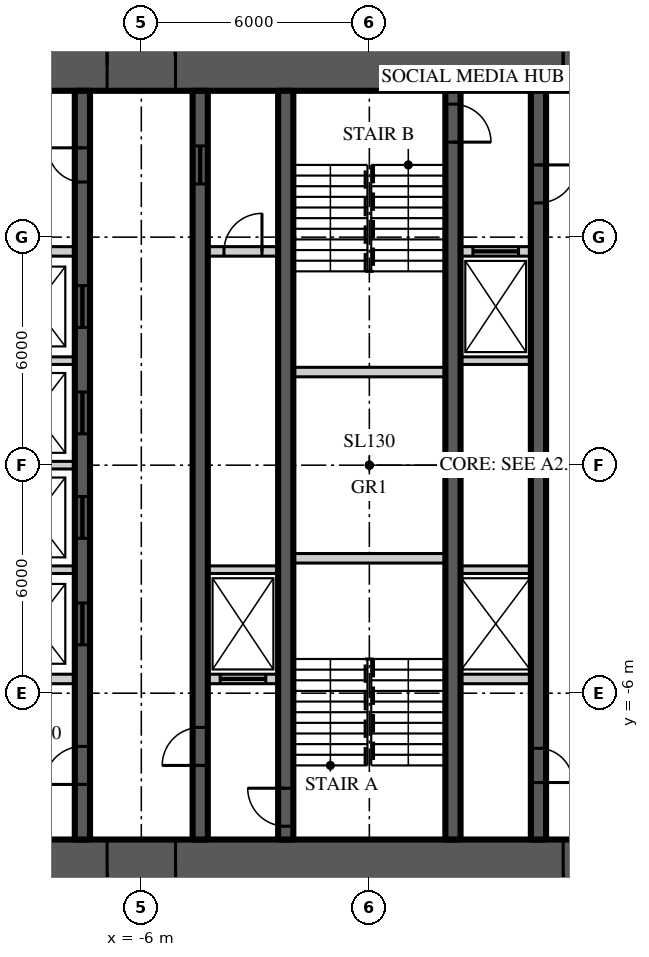
"""IFC4 building model, lengths in metres.
Left out: names, types, materials, properties, quantities, classifications, styles, units other than length and angle.
Written with IfcOpenShell. Run it as: python <this file> out.ifc"""

import sys

from ifc_helpers import new_model, si_unit, direction, frame, frame_2d, origin, place, context, subcontext, project, spatial, rectangle, extrude, element, fill, save


model = new_model("IFC4")
c1 = context("Model", 3, precision=1e-05, world=origin(), true_north=direction((0.0, 1.0)))
c2 = subcontext(c1, "Body", "Model", "MODEL_VIEW")
j1 = project(units=[si_unit("LENGTHUNIT", "METRE"), si_unit("PLANEANGLEUNIT", "RADIAN")], contexts=[c1])
p1 = place(None, origin())
s1 = spatial("IfcSite", under=j1, at=p1, CompositionType="ELEMENT")
p2 = place(p1, origin())
s2 = spatial("IfcBuilding", under=s1, at=p2, CompositionType="ELEMENT")
p3 = place(p2, frame((0.0, 0.0, 70.8)))
s3 = spatial("IfcBuildingStorey", under=s2, at=p3, CompositionType="ELEMENT", Elevation=70.8)
p4 = place(p3, frame((-11.15, 10.5, 0.0), z_axis=(0.0, 0.0, 1.0), x_axis=(1.0, 0.0, 0.0)))
e1 = element("IfcWall", 1, at=p4, inside=s3, PredefinedType="SHEAR", context=c2, shape_type="SweptSolid", body=[
    extrude(rectangle(XDim=22.3, YDim=1.3, at=frame_2d((11.15, 0.0))), origin(), (0.0, 0.0, 1.0), 3.9),
])
p5 = place(p4, frame((4.25, 0.0, 0.0)))
e2 = element("IfcOpeningElement", 2, at=p5, cuts=e1, PredefinedType="OPENING", context=c2, shape_type="SweptSolid", body=[
    extrude(rectangle(XDim=1.8, YDim=2.2, at=frame_2d((0.9, 1.1))), frame((0.0, 0.66, 0.0), z_axis=(0.0, -1.0, 0.0), x_axis=(1.0, 0.0, 0.0)), (0.0, 0.0, 1.0), 1.32),
])
p6 = place(p4, frame((16.25, 0.0, 0.0)))
e3 = element("IfcOpeningElement", 3, at=p6, cuts=e1, PredefinedType="OPENING", context=c2, shape_type="SweptSolid", body=[
    extrude(rectangle(XDim=1.8, YDim=2.2, at=frame_2d((0.9, 1.1))), frame((0.0, 0.66, 0.0), z_axis=(0.0, -1.0, 0.0), x_axis=(1.0, 0.0, 0.0)), (0.0, 0.0, 1.0), 1.32),
])
p7 = place(p3, frame((11.15, -10.5, 0.0), z_axis=(0.0, 0.0, 1.0), x_axis=(-1.0, 0.0, 0.0)))
e4 = element("IfcWall", 4, at=p7, inside=s3, PredefinedType="SHEAR", context=c2, shape_type="SweptSolid", body=[
    extrude(rectangle(XDim=22.3, YDim=1.3, at=frame_2d((11.15, 0.0))), origin(), (0.0, 0.0, 1.0), 3.9),
])
p8 = place(p7, frame((16.25, 0.0, 0.0)))
e5 = element("IfcOpeningElement", 5, at=p8, cuts=e4, PredefinedType="OPENING", context=c2, shape_type="SweptSolid", body=[
    extrude(rectangle(XDim=1.8, YDim=2.2, at=frame_2d((0.9, 1.1))), frame((0.0, 0.66, 0.0), z_axis=(0.0, -1.0, 0.0), x_axis=(1.0, 0.0, 0.0)), (0.0, 0.0, 1.0), 1.32),
])
p9 = place(p7, frame((4.25, 0.0, 0.0)))
e6 = element("IfcOpeningElement", 6, at=p9, cuts=e4, PredefinedType="OPENING", context=c2, shape_type="SweptSolid", body=[
    extrude(rectangle(XDim=1.8, YDim=2.2, at=frame_2d((0.9, 1.1))), frame((0.0, 0.66, 0.0), z_axis=(0.0, -1.0, 0.0), x_axis=(1.0, 0.0, 0.0)), (0.0, 0.0, 1.0), 1.32),
])
p10 = place(p3, frame((-7.55, -9.85, 0.0), z_axis=(0.0, 0.0, 1.0), x_axis=(0.0, 1.0, 0.0)))
e7 = element("IfcWall", 7, at=p10, inside=s3, PredefinedType="SHEAR", context=c2, shape_type="SweptSolid", body=[
    extrude(rectangle(XDim=19.7, YDim=0.4, at=frame_2d((9.85, 0.0))), origin(), (0.0, 0.0, 1.0), 3.9),
])
p11 = place(p10, frame((1.45, 0.0, 0.0)))
e8 = element("IfcOpeningElement", 8, at=p11, cuts=e7, PredefinedType="OPENING", context=c2, shape_type="SweptSolid", body=[
    extrude(rectangle(XDim=1.0, YDim=2.2, at=frame_2d((0.5, 1.1))), frame((0.0, 0.21, 0.0), z_axis=(0.0, -1.0, 0.0), x_axis=(1.0, 0.0, 0.0)), (0.0, 0.0, 1.0), 0.42),
])
p12 = place(p10, frame((17.3, 0.0, 0.0)))
e9 = element("IfcOpeningElement", 9, at=p12, cuts=e7, PredefinedType="OPENING", context=c2, shape_type="SweptSolid", body=[
    extrude(rectangle(XDim=0.9, YDim=2.1, at=frame_2d((0.45, 1.05))), frame((0.0, 0.21, 0.0), z_axis=(0.0, -1.0, 0.0), x_axis=(1.0, 0.0, 0.0)), (0.0, 0.0, 1.0), 0.42),
])
p13 = place(p10, frame((5.125, 0.0, 0.0)))
e10 = element("IfcOpeningElement", 10, at=p13, cuts=e7, PredefinedType="OPENING", context=c2, shape_type="SweptSolid", body=[
    extrude(rectangle(XDim=1.1, YDim=2.2, at=frame_2d((0.55, 1.1))), frame((0.0, 0.21, 0.0), z_axis=(0.0, -1.0, 0.0), x_axis=(1.0, 0.0, 0.0)), (0.0, 0.0, 1.0), 0.42),
])
p14 = place(p10, frame((7.925, 0.0, 0.0)))
e11 = element("IfcOpeningElement", 11, at=p14, cuts=e7, PredefinedType="OPENING", context=c2, shape_type="SweptSolid", body=[
    extrude(rectangle(XDim=1.1, YDim=2.2, at=frame_2d((0.55, 1.1))), frame((0.0, 0.21, 0.0), z_axis=(0.0, -1.0, 0.0), x_axis=(1.0, 0.0, 0.0)), (0.0, 0.0, 1.0), 0.42),
])
p15 = place(p10, frame((10.675, 0.0, 0.0)))
e12 = element("IfcOpeningElement", 12, at=p15, cuts=e7, PredefinedType="OPENING", context=c2, shape_type="SweptSolid", body=[
    extrude(rectangle(XDim=1.1, YDim=2.2, at=frame_2d((0.55, 1.1))), frame((0.0, 0.21, 0.0), z_axis=(0.0, -1.0, 0.0), x_axis=(1.0, 0.0, 0.0)), (0.0, 0.0, 1.0), 0.42),
])
p16 = place(p10, frame((13.475, 0.0, 0.0)))
e13 = element("IfcOpeningElement", 13, at=p16, cuts=e7, PredefinedType="OPENING", context=c2, shape_type="SweptSolid", body=[
    extrude(rectangle(XDim=1.1, YDim=2.2, at=frame_2d((0.55, 1.1))), frame((0.0, 0.21, 0.0), z_axis=(0.0, -1.0, 0.0), x_axis=(1.0, 0.0, 0.0)), (0.0, 0.0, 1.0), 0.42),
])
p17 = place(p3, frame((-4.45, -9.85, 0.0), z_axis=(0.0, 0.0, 1.0), x_axis=(0.0, 1.0, 0.0)))
e14 = element("IfcWall", 14, at=p17, inside=s3, PredefinedType="SHEAR", context=c2, shape_type="SweptSolid", body=[
    extrude(rectangle(XDim=19.7, YDim=0.4, at=frame_2d((9.85, 0.0))), origin(), (0.0, 0.0, 1.0), 3.9),
])
p18 = place(p17, frame((1.95, 0.0, 0.0)))
e15 = element("IfcOpeningElement", 15, at=p18, cuts=e14, PredefinedType="OPENING", context=c2, shape_type="SweptSolid", body=[
    extrude(rectangle(XDim=1.0, YDim=2.2, at=frame_2d((0.5, 1.1))), frame((0.0, 0.21, 0.0), z_axis=(0.0, -1.0, 0.0), x_axis=(1.0, 0.0, 0.0)), (0.0, 0.0, 1.0), 0.42),
])
p19 = place(p17, frame((17.25, 0.0, 0.0)))
e16 = element("IfcOpeningElement", 16, at=p19, cuts=e14, PredefinedType="OPENING", context=c2, shape_type="SweptSolid", body=[
    extrude(rectangle(XDim=1.0, YDim=2.1, at=frame_2d((0.5, 1.05))), frame((0.0, 0.21, 0.0), z_axis=(0.0, -1.0, 0.0), x_axis=(1.0, 0.0, 0.0)), (0.0, 0.0, 1.0), 0.42),
])
p20 = place(p3, frame((4.45, 9.85, 0.0), z_axis=(0.0, 0.0, 1.0), x_axis=(0.0, -1.0, 0.0)))
e17 = element("IfcWall", 17, at=p20, inside=s3, PredefinedType="SHEAR", context=c2, shape_type="SweptSolid", body=[
    extrude(rectangle(XDim=19.7, YDim=0.4, at=frame_2d((9.85, 0.0))), origin(), (0.0, 0.0, 1.0), 3.9),
])
p21 = place(p20, frame((1.95, 0.0, 0.0)))
e18 = element("IfcOpeningElement", 18, at=p21, cuts=e17, PredefinedType="OPENING", context=c2, shape_type="SweptSolid", body=[
    extrude(rectangle(XDim=1.0, YDim=2.2, at=frame_2d((0.5, 1.1))), frame((0.0, 0.21, 0.0), z_axis=(0.0, -1.0, 0.0), x_axis=(1.0, 0.0, 0.0)), (0.0, 0.0, 1.0), 0.42),
])
p22 = place(p20, frame((17.3, 0.0, 0.0)))
e19 = element("IfcOpeningElement", 19, at=p22, cuts=e17, PredefinedType="OPENING", context=c2, shape_type="SweptSolid", body=[
    extrude(rectangle(XDim=0.9, YDim=2.1, at=frame_2d((0.45, 1.05))), frame((0.0, 0.21, 0.0), z_axis=(0.0, -1.0, 0.0), x_axis=(1.0, 0.0, 0.0)), (0.0, 0.0, 1.0), 0.42),
])
p23 = place(p3, frame((-2.2, -9.85, 0.0), z_axis=(0.0, 0.0, 1.0), x_axis=(0.0, 1.0, 0.0)))
e20 = element("IfcWall", 20, at=p23, inside=s3, PredefinedType="SHEAR", context=c2, shape_type="SweptSolid", body=[
    extrude(rectangle(XDim=19.7, YDim=0.4, at=frame_2d((9.85, 0.0))), origin(), (0.0, 0.0, 1.0), 3.9),
])
p24 = place(p23, frame((0.35, 0.0, 0.0)))
e21 = element("IfcOpeningElement", 21, at=p24, cuts=e20, PredefinedType="OPENING", context=c2, shape_type="SweptSolid", body=[
    extrude(rectangle(XDim=1.0, YDim=2.2, at=frame_2d((0.5, 1.1))), frame((0.0, 0.21, 0.0), z_axis=(0.0, -1.0, 0.0), x_axis=(1.0, 0.0, 0.0)), (0.0, 0.0, 1.0), 0.42),
])
p25 = place(p3, frame((2.2, 9.85, 0.0), z_axis=(0.0, 0.0, 1.0), x_axis=(0.0, -1.0, 0.0)))
e22 = element("IfcWall", 22, at=p25, inside=s3, PredefinedType="SHEAR", context=c2, shape_type="SweptSolid", body=[
    extrude(rectangle(XDim=19.7, YDim=0.4, at=frame_2d((9.85, 0.0))), origin(), (0.0, 0.0, 1.0), 3.9),
])
p26 = place(p25, frame((0.35, 0.0, 0.0)))
e23 = element("IfcOpeningElement", 23, at=p26, cuts=e22, PredefinedType="OPENING", context=c2, shape_type="SweptSolid", body=[
    extrude(rectangle(XDim=1.0, YDim=2.2, at=frame_2d((0.5, 1.1))), frame((0.0, 0.21, 0.0), z_axis=(0.0, -1.0, 0.0), x_axis=(1.0, 0.0, 0.0)), (0.0, 0.0, 1.0), 0.42),
])
p27 = place(p3, frame((-9.85, 5.625, 0.0), z_axis=(0.0, 0.0, 1.0), x_axis=(1.0, 0.0, 0.0)))
e24 = element("IfcWall", 24, at=p27, inside=s3, PredefinedType="SOLIDWALL", context=c2, shape_type="SweptSolid", body=[
    extrude(rectangle(XDim=2.1, YDim=0.25, at=frame_2d((1.05, 0.0))), origin(), (0.0, 0.0, 1.0), 3.7),
])
p28 = place(p3, frame((-4.25, 5.625, 0.0), z_axis=(0.0, 0.0, 1.0), x_axis=(1.0, 0.0, 0.0)))
e25 = element("IfcWall", 25, at=p28, inside=s3, PredefinedType="SOLIDWALL", context=c2, shape_type="SweptSolid", body=[
    extrude(rectangle(XDim=1.85, YDim=0.25, at=frame_2d((0.925, 0.0))), origin(), (0.0, 0.0, 1.0), 3.7),
])
p29 = place(p28, frame((0.425, 0.0, 0.0)))
e26 = element("IfcOpeningElement", 26, at=p29, cuts=e25, PredefinedType="OPENING", context=c2, shape_type="SweptSolid", body=[
    extrude(rectangle(XDim=1.0, YDim=2.2, at=frame_2d((0.5, 1.1))), frame((0.0, 0.135, 0.0), z_axis=(0.0, -1.0, 0.0), x_axis=(1.0, 0.0, 0.0)), (0.0, 0.0, 1.0), 0.27),
])
p30 = place(p3, frame((2.4, 5.625, 0.0), z_axis=(0.0, 0.0, 1.0), x_axis=(1.0, 0.0, 0.0)))
e27 = element("IfcWall", 27, at=p30, inside=s3, PredefinedType="SOLIDWALL", context=c2, shape_type="SweptSolid", body=[
    extrude(rectangle(XDim=1.85, YDim=0.25, at=frame_2d((0.925, 0.0))), origin(), (0.0, 0.0, 1.0), 3.7),
])
p31 = place(p30, frame((0.325, 0.0, 0.0)))
e28 = element("IfcOpeningElement", 28, at=p31, cuts=e27, PredefinedType="OPENING", context=c2, shape_type="SweptSolid", body=[
    extrude(rectangle(XDim=1.2, YDim=2.2, at=frame_2d((0.6, 1.1))), frame((0.0, 0.135, 0.0), z_axis=(0.0, -1.0, 0.0), x_axis=(1.0, 0.0, 0.0)), (0.0, 0.0, 1.0), 0.27),
])
p32 = place(p3, frame((-9.85, -5.625, 0.0), z_axis=(0.0, 0.0, 1.0), x_axis=(1.0, 0.0, 0.0)))
e29 = element("IfcWall", 29, at=p32, inside=s3, PredefinedType="SOLIDWALL", context=c2, shape_type="SweptSolid", body=[
    extrude(rectangle(XDim=2.1, YDim=0.25, at=frame_2d((1.05, 0.0))), origin(), (0.0, 0.0, 1.0), 3.7),
])
p33 = place(p3, frame((-4.25, -5.625, 0.0), z_axis=(0.0, 0.0, 1.0), x_axis=(1.0, 0.0, 0.0)))
e30 = element("IfcWall", 30, at=p33, inside=s3, PredefinedType="SOLIDWALL", context=c2, shape_type="SweptSolid", body=[
    extrude(rectangle(XDim=1.85, YDim=0.25, at=frame_2d((0.925, 0.0))), origin(), (0.0, 0.0, 1.0), 3.7),
])
p34 = place(p33, frame((0.325, 0.0, 0.0)))
e31 = element("IfcOpeningElement", 31, at=p34, cuts=e30, PredefinedType="OPENING", context=c2, shape_type="SweptSolid", body=[
    extrude(rectangle(XDim=1.2, YDim=2.2, at=frame_2d((0.6, 1.1))), frame((0.0, 0.135, 0.0), z_axis=(0.0, -1.0, 0.0), x_axis=(1.0, 0.0, 0.0)), (0.0, 0.0, 1.0), 0.27),
])
p35 = place(p3, frame((2.4, -5.625, 0.0), z_axis=(0.0, 0.0, 1.0), x_axis=(1.0, 0.0, 0.0)))
e32 = element("IfcWall", 32, at=p35, inside=s3, PredefinedType="SOLIDWALL", context=c2, shape_type="SweptSolid", body=[
    extrude(rectangle(XDim=1.85, YDim=0.25, at=frame_2d((0.925, 0.0))), origin(), (0.0, 0.0, 1.0), 3.7),
])
for number, where, z_axis, x_axis in (
    (33, (-2.0, -2.45, 0.0), (0.0, 0.0, 1.0), (1.0, 0.0, 0.0)),
    (34, (-2.0, 2.45, 0.0), (0.0, 0.0, 1.0), (1.0, 0.0, 0.0)),
):
    element("IfcWall", number, at=place(p3, frame(where, z_axis=z_axis, x_axis=x_axis)), inside=s3, PredefinedType="SOLIDWALL", context=c2, shape_type="SweptSolid", body=[
        extrude(rectangle(XDim=4.0, YDim=0.25, at=frame_2d((2.0, 0.0))), origin(), (0.0, 0.0, 1.0), 3.7),
    ])
p36 = place(p3, frame((-9.85, -2.75, 0.0), z_axis=(0.0, 0.0, 1.0), x_axis=(1.0, 0.0, 0.0)))
e35 = element("IfcWall", 35, at=p36, inside=s3, PredefinedType="SOLIDWALL", context=c2, shape_type="SweptSolid", body=[
    extrude(rectangle(XDim=2.1, YDim=0.2, at=frame_2d((1.05, 0.0))), origin(), (0.0, 0.0, 1.0), 3.7),
])
for number, where, z_axis, x_axis in (
    (36, (-4.25, -2.75, 0.0), (0.0, 0.0, 1.0), (1.0, 0.0, 0.0)),
    (37, (2.4, -2.75, 0.0), (0.0, 0.0, 1.0), (1.0, 0.0, 0.0)),
):
    element("IfcWall", number, at=place(p3, frame(where, z_axis=z_axis, x_axis=x_axis)), inside=s3, PredefinedType="SOLIDWALL", context=c2, shape_type="SweptSolid", body=[
        extrude(rectangle(XDim=1.85, YDim=0.2, at=frame_2d((0.925, 0.0))), origin(), (0.0, 0.0, 1.0), 3.7),
    ])
for number, where, z_axis, x_axis in (
    (38, (-9.85, 0.0, 0.0), (0.0, 0.0, 1.0), (1.0, 0.0, 0.0)),
    (39, (-9.85, 2.75, 0.0), (0.0, 0.0, 1.0), (1.0, 0.0, 0.0)),
):
    element("IfcWall", number, at=place(p3, frame(where, z_axis=z_axis, x_axis=x_axis)), inside=s3, PredefinedType="SOLIDWALL", context=c2, shape_type="SweptSolid", body=[
        extrude(rectangle(XDim=2.1, YDim=0.2, at=frame_2d((1.05, 0.0))), origin(), (0.0, 0.0, 1.0), 3.7),
    ])
p37 = place(p3, frame((2.4, 2.75, 0.0), z_axis=(0.0, 0.0, 1.0), x_axis=(1.0, 0.0, 0.0)))
e40 = element("IfcWall", 40, at=p37, inside=s3, PredefinedType="SOLIDWALL", context=c2, shape_type="SweptSolid", body=[
    extrude(rectangle(XDim=1.85, YDim=0.2, at=frame_2d((0.925, 0.0))), origin(), (0.0, 0.0, 1.0), 3.7),
])
p38 = place(p5, origin())
e41 = element("IfcDoor", 41, at=p38, inside=s3, OperationType="DOUBLE_DOOR_DOUBLE_SWING", PredefinedType="DOOR", context=c2, shape_type="SweptSolid", body=[
    extrude(rectangle(XDim=1.8, YDim=2.2, at=frame_2d((0.9, 1.1))), frame((0.0, 0.025, 0.0), z_axis=(0.0, -1.0, 0.0), x_axis=(1.0, 0.0, 0.0)), (0.0, 0.0, 1.0), 0.05),
])
fill(e2, e41)
p39 = place(p8, origin())
e42 = element("IfcDoor", 42, at=p39, inside=s3, OperationType="DOUBLE_DOOR_DOUBLE_SWING", PredefinedType="DOOR", context=c2, shape_type="SweptSolid", body=[
    extrude(rectangle(XDim=1.8, YDim=2.2, at=frame_2d((0.9, 1.1))), frame((0.0, 0.025, 0.0), z_axis=(0.0, -1.0, 0.0), x_axis=(1.0, 0.0, 0.0)), (0.0, 0.0, 1.0), 0.05),
])
fill(e5, e42)
p40 = place(p6, origin())
e43 = element("IfcDoor", 43, at=p40, inside=s3, OperationType="DOUBLE_DOOR_DOUBLE_SWING", PredefinedType="DOOR", context=c2, shape_type="SweptSolid", body=[
    extrude(rectangle(XDim=1.8, YDim=2.2, at=frame_2d((0.9, 1.1))), frame((0.0, 0.025, 0.0), z_axis=(0.0, -1.0, 0.0), x_axis=(1.0, 0.0, 0.0)), (0.0, 0.0, 1.0), 0.05),
])
fill(e3, e43)
p41 = place(p9, origin())
e44 = element("IfcDoor", 44, at=p41, inside=s3, OperationType="DOUBLE_DOOR_DOUBLE_SWING", PredefinedType="DOOR", context=c2, shape_type="SweptSolid", body=[
    extrude(rectangle(XDim=1.8, YDim=2.2, at=frame_2d((0.9, 1.1))), frame((0.0, 0.025, 0.0), z_axis=(0.0, -1.0, 0.0), x_axis=(1.0, 0.0, 0.0)), (0.0, 0.0, 1.0), 0.05),
])
fill(e6, e44)
p42 = place(p11, origin())
e45 = element("IfcDoor", 45, at=p42, inside=s3, OperationType="SINGLE_SWING_LEFT", PredefinedType="DOOR", context=c2, shape_type="SweptSolid", body=[
    extrude(rectangle(XDim=1.0, YDim=2.2, at=frame_2d((0.5, 1.1))), frame((0.0, 0.025, 0.0), z_axis=(0.0, -1.0, 0.0), x_axis=(1.0, 0.0, 0.0)), (0.0, 0.0, 1.0), 0.05),
])
fill(e8, e45)
p43 = place(p18, origin())
e46 = element("IfcDoor", 46, at=p43, inside=s3, OperationType="SINGLE_SWING_LEFT", PredefinedType="DOOR", context=c2, shape_type="SweptSolid", body=[
    extrude(rectangle(XDim=1.0, YDim=2.2, at=frame_2d((0.5, 1.1))), frame((0.0, 0.025, 0.0), z_axis=(0.0, -1.0, 0.0), x_axis=(1.0, 0.0, 0.0)), (0.0, 0.0, 1.0), 0.05),
])
fill(e15, e46)
p44 = place(p24, origin())
e47 = element("IfcDoor", 47, at=p44, inside=s3, OperationType="SINGLE_SWING_RIGHT", PredefinedType="DOOR", context=c2, shape_type="SweptSolid", body=[
    extrude(rectangle(XDim=1.0, YDim=2.2, at=frame_2d((0.5, 1.1))), frame((0.0, 0.025, 0.0), z_axis=(0.0, -1.0, 0.0), x_axis=(1.0, 0.0, 0.0)), (0.0, 0.0, 1.0), 0.05),
])
fill(e21, e47)
p45 = place(p21, origin())
e48 = element("IfcDoor", 48, at=p45, inside=s3, OperationType="SINGLE_SWING_LEFT", PredefinedType="DOOR", context=c2, shape_type="SweptSolid", body=[
    extrude(rectangle(XDim=1.0, YDim=2.2, at=frame_2d((0.5, 1.1))), frame((0.0, 0.025, 0.0), z_axis=(0.0, -1.0, 0.0), x_axis=(1.0, 0.0, 0.0)), (0.0, 0.0, 1.0), 0.05),
])
fill(e18, e48)
p46 = place(p26, origin())
e49 = element("IfcDoor", 49, at=p46, inside=s3, OperationType="SINGLE_SWING_RIGHT", PredefinedType="DOOR", context=c2, shape_type="SweptSolid", body=[
    extrude(rectangle(XDim=1.0, YDim=2.2, at=frame_2d((0.5, 1.1))), frame((0.0, 0.025, 0.0), z_axis=(0.0, -1.0, 0.0), x_axis=(1.0, 0.0, 0.0)), (0.0, 0.0, 1.0), 0.05),
])
fill(e23, e49)
p47 = place(p12, origin())
e50 = element("IfcDoor", 50, at=p47, inside=s3, OperationType="SINGLE_SWING_RIGHT", PredefinedType="DOOR", context=c2, shape_type="SweptSolid", body=[
    extrude(rectangle(XDim=0.9, YDim=2.1, at=frame_2d((0.45, 1.05))), frame((0.0, 0.025, 0.0), z_axis=(0.0, -1.0, 0.0), x_axis=(1.0, 0.0, 0.0)), (0.0, 0.0, 1.0), 0.05),
])
fill(e9, e50)
p48 = place(p19, origin())
e51 = element("IfcDoor", 51, at=p48, inside=s3, OperationType="SLIDING_TO_LEFT", PredefinedType="DOOR", context=c2, shape_type="SweptSolid", body=[
    extrude(rectangle(XDim=1.0, YDim=2.1, at=frame_2d((0.5, 1.05))), frame((0.0, 0.025, 0.0), z_axis=(0.0, -1.0, 0.0), x_axis=(1.0, 0.0, 0.0)), (0.0, 0.0, 1.0), 0.05),
])
fill(e16, e51)
p49 = place(p22, origin())
e52 = element("IfcDoor", 52, at=p49, inside=s3, OperationType="SINGLE_SWING_RIGHT", PredefinedType="DOOR", context=c2, shape_type="SweptSolid", body=[
    extrude(rectangle(XDim=0.9, YDim=2.1, at=frame_2d((0.45, 1.05))), frame((0.0, 0.025, 0.0), z_axis=(0.0, -1.0, 0.0), x_axis=(1.0, 0.0, 0.0)), (0.0, 0.0, 1.0), 0.05),
])
fill(e19, e52)
p50 = place(p13, origin())
e53 = element("IfcDoor", 53, at=p50, inside=s3, OperationType="SLIDING_TO_LEFT", PredefinedType="DOOR", context=c2, shape_type="SweptSolid", body=[
    extrude(rectangle(XDim=1.1, YDim=2.2, at=frame_2d((0.55, 1.1))), frame((0.0, 0.025, 0.0), z_axis=(0.0, -1.0, 0.0), x_axis=(1.0, 0.0, 0.0)), (0.0, 0.0, 1.0), 0.05),
])
fill(e10, e53)
p51 = place(p14, origin())
e54 = element("IfcDoor", 54, at=p51, inside=s3, OperationType="SLIDING_TO_LEFT", PredefinedType="DOOR", context=c2, shape_type="SweptSolid", body=[
    extrude(rectangle(XDim=1.1, YDim=2.2, at=frame_2d((0.55, 1.1))), frame((0.0, 0.025, 0.0), z_axis=(0.0, -1.0, 0.0), x_axis=(1.0, 0.0, 0.0)), (0.0, 0.0, 1.0), 0.05),
])
fill(e11, e54)
p52 = place(p15, origin())
e55 = element("IfcDoor", 55, at=p52, inside=s3, OperationType="SLIDING_TO_LEFT", PredefinedType="DOOR", context=c2, shape_type="SweptSolid", body=[
    extrude(rectangle(XDim=1.1, YDim=2.2, at=frame_2d((0.55, 1.1))), frame((0.0, 0.025, 0.0), z_axis=(0.0, -1.0, 0.0), x_axis=(1.0, 0.0, 0.0)), (0.0, 0.0, 1.0), 0.05),
])
fill(e12, e55)
p53 = place(p16, origin())
e56 = element("IfcDoor", 56, at=p53, inside=s3, OperationType="SLIDING_TO_LEFT", PredefinedType="DOOR", context=c2, shape_type="SweptSolid", body=[
    extrude(rectangle(XDim=1.1, YDim=2.2, at=frame_2d((0.55, 1.1))), frame((0.0, 0.025, 0.0), z_axis=(0.0, -1.0, 0.0), x_axis=(1.0, 0.0, 0.0)), (0.0, 0.0, 1.0), 0.05),
])
fill(e13, e56)
p54 = place(p34, origin())
e57 = element("IfcDoor", 57, at=p54, inside=s3, OperationType="SLIDING_TO_LEFT", PredefinedType="DOOR", context=c2, shape_type="SweptSolid", body=[
    extrude(rectangle(XDim=1.2, YDim=2.2, at=frame_2d((0.6, 1.1))), frame((0.0, 0.025, 0.0), z_axis=(0.0, -1.0, 0.0), x_axis=(1.0, 0.0, 0.0)), (0.0, 0.0, 1.0), 0.05),
])
fill(e31, e57)
p55 = place(p31, origin())
e58 = element("IfcDoor", 58, at=p55, inside=s3, OperationType="SLIDING_TO_LEFT", PredefinedType="DOOR", context=c2, shape_type="SweptSolid", body=[
    extrude(rectangle(XDim=1.2, YDim=2.2, at=frame_2d((0.6, 1.1))), frame((0.0, 0.025, 0.0), z_axis=(0.0, -1.0, 0.0), x_axis=(1.0, 0.0, 0.0)), (0.0, 0.0, 1.0), 0.05),
])
fill(e28, e58)
p56 = place(p29, origin())
e59 = element("IfcDoor", 59, at=p56, inside=s3, OperationType="SINGLE_SWING_RIGHT", PredefinedType="DOOR", context=c2, shape_type="SweptSolid", body=[
    extrude(rectangle(XDim=1.0, YDim=2.2, at=frame_2d((0.5, 1.1))), frame((0.0, 0.025, 0.0), z_axis=(0.0, -1.0, 0.0), x_axis=(1.0, 0.0, 0.0)), (0.0, 0.0, 1.0), 0.05),
])
fill(e26, e59)
save(model, sys.argv[1])
